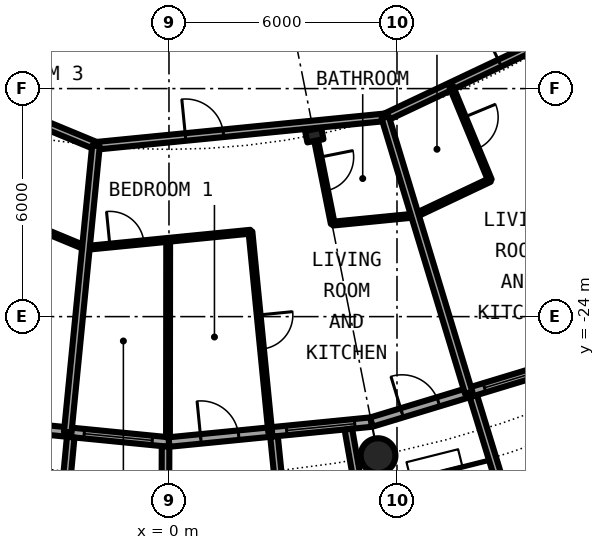
"""IFC4 building model, lengths in metres.
Left out: names, types, materials, properties, quantities, classifications, styles, units other than length and angle.
Written with IfcOpenShell. Run it as: python <this file> out.ifc"""

import sys

from ifc_helpers import new_model, si_unit, direction, frame, frame_2d, origin, origin_2d, place, context, subcontext, project, spatial, rectangle, circle, hollow_circle, i_section, extrude, element, fill, save


model = new_model("IFC4")
c1 = context("Model", 3, precision=1e-05, world=origin(), true_north=direction((0.0, 1.0)))
c2 = subcontext(c1, "Body", "Model", "MODEL_VIEW")
j1 = project(units=[si_unit("LENGTHUNIT", "METRE"), si_unit("PLANEANGLEUNIT", "RADIAN")], contexts=[c1])
p1 = place(None, origin())
s1 = spatial("IfcSite", under=j1, at=p1, CompositionType="ELEMENT")
p2 = place(p1, origin())
s2 = spatial("IfcBuilding", under=s1, at=p2, CompositionType="ELEMENT")
p3 = place(p2, frame((0.0, 0.0, 120.8)))
s3 = spatial("IfcBuildingStorey", under=s2, at=p3, CompositionType="ELEMENT", Elevation=120.8)
p4 = place(p3, frame((5.501, -27.658, 0.0), z_axis=(0.0, 0.0, 1.0), x_axis=(1.0, 0.0, 0.0)))
e1 = element("IfcColumn", 1, at=p4, inside=s3, PredefinedType="COLUMN", context=c2, shape_type="SweptSolid", body=[
    extrude(hollow_circle(Radius=0.457, WallThickness=0.04, at=origin_2d()), origin(), (0.0, 0.0, 1.0), 3.05),
])
p5 = place(p3, frame((3.824, -19.223, 0.0), z_axis=(0.0, 0.0, 1.0), x_axis=(0.195090322016, -0.980785280403, 0.0)))
e2 = element("IfcColumn", 2, at=p5, inside=s3, PredefinedType="COLUMN", context=c2, shape_type="SweptSolid", body=[
    extrude(i_section(OverallWidth=0.307, OverallDepth=0.432, WebThickness=0.021, FlangeThickness=0.04, FilletRadius=0.027, at=origin_2d()), origin(), (0.0, 0.0, 1.0), 3.05),
])
p6 = place(p3, frame((-5.326, -26.775, 0.0), z_axis=(0.0, 0.0, 1.0), x_axis=(0.995173996315, -0.098126026407, 0.0)))
e3 = element("IfcWall", 3, at=p6, inside=s3, PredefinedType="SOLIDWALL", context=c2, shape_type="SweptSolid", body=[
    extrude(rectangle(XDim=5.352, YDim=0.25, at=frame_2d((2.676, 0.0))), origin(), (0.0, 0.0, 1.0), 2.7),
])
p7 = place(p6, frame((0.841, 0.0, 0.0)))
e4 = element("IfcOpeningElement", 4, at=p7, cuts=e3, PredefinedType="OPENING", context=c2, shape_type="SweptSolid", body=[
    extrude(rectangle(XDim=1.0, YDim=2.2, at=frame_2d((0.5, 1.1))), frame((0.0, 0.135, 0.0), z_axis=(0.0, -1.0, 0.0), x_axis=(1.0, 0.0, 0.0)), (0.0, 0.0, 1.0), 0.27),
])
p8 = place(p6, frame((3.111, 0.0, 0.3)))
e5 = element("IfcOpeningElement", 5, at=p8, cuts=e3, PredefinedType="OPENING", context=c2, shape_type="SweptSolid", body=[
    extrude(rectangle(XDim=1.8, YDim=2.1, at=frame_2d((0.9, 1.05))), frame((0.0, 0.135, 0.0), z_axis=(0.0, -1.0, 0.0), x_axis=(1.0, 0.0, 0.0)), (0.0, 0.0, 1.0), 0.27),
])
p9 = place(p3, frame((-2.586, -27.171, -0.03), z_axis=(0.0, 0.0, 1.0), x_axis=(-0.094548432284, -0.995520262954, 0.0)))
e6 = element("IfcWall", 6, at=p9, inside=s3, PredefinedType="SOLIDWALL", context=c2, shape_type="SweptSolid", body=[
    extrude(rectangle(XDim=3.006, YDim=0.2, at=frame_2d((1.503, 0.0))), origin(), (0.0, 0.0, 1.0), 2.73),
])
p10 = place(p3, frame((-0.09, -27.417, -0.03), z_axis=(0.0, 0.0, 1.0), x_axis=(-0.00347308367, -0.999993968827, 0.0)))
e7 = element("IfcWall", 7, at=p10, inside=s3, PredefinedType="SOLIDWALL", context=c2, shape_type="SweptSolid", body=[
    extrude(rectangle(XDim=2.882, YDim=0.2, at=frame_2d((1.441, 0.0))), origin(), (0.0, 0.0, 1.0), 2.73),
])
p11 = place(p3, frame((0.0, -27.3, 0.0), z_axis=(0.0, 0.0, 1.0), x_axis=(0.995173996315, 0.098126026407, 0.0)))
e8 = element("IfcWall", 8, at=p11, inside=s3, PredefinedType="SOLIDWALL", context=c2, shape_type="SweptSolid", body=[
    extrude(rectangle(XDim=5.352, YDim=0.25, at=frame_2d((2.676, 0.0))), origin(), (0.0, 0.0, 1.0), 2.7),
])
p12 = place(p11, frame((0.841, 0.0, 0.0)))
e9 = element("IfcOpeningElement", 9, at=p12, cuts=e8, PredefinedType="OPENING", context=c2, shape_type="SweptSolid", body=[
    extrude(rectangle(XDim=1.0, YDim=2.2, at=frame_2d((0.5, 1.1))), frame((0.0, 0.135, 0.0), z_axis=(0.0, -1.0, 0.0), x_axis=(1.0, 0.0, 0.0)), (0.0, 0.0, 1.0), 0.27),
])
p13 = place(p11, frame((3.111, 0.0, 0.3)))
e10 = element("IfcOpeningElement", 10, at=p13, cuts=e8, PredefinedType="OPENING", context=c2, shape_type="SweptSolid", body=[
    extrude(rectangle(XDim=1.8, YDim=2.1, at=frame_2d((0.9, 1.05))), frame((0.0, 0.135, 0.0), z_axis=(0.0, -1.0, 0.0), x_axis=(1.0, 0.0, 0.0)), (0.0, 0.0, 1.0), 0.27),
])
p14 = place(p3, frame((2.764, -27.153, -0.03), z_axis=(0.0, 0.0, 1.0), x_axis=(0.101505487237, -0.994834979311, 0.0)))
e11 = element("IfcWall", 11, at=p14, inside=s3, PredefinedType="SOLIDWALL", context=c2, shape_type="SweptSolid", body=[
    extrude(rectangle(XDim=3.007, YDim=0.2, at=frame_2d((1.503, 0.0))), origin(), (0.0, 0.0, 1.0), 2.73),
])
p15 = place(p3, frame((4.72, -26.961, -0.03), z_axis=(0.0, 0.0, 1.0), x_axis=(0.172463232037, -0.98501595601, 0.0)))
e12 = element("IfcWall", 12, at=p15, inside=s3, PredefinedType="SOLIDWALL", context=c2, shape_type="SweptSolid", body=[
    extrude(rectangle(XDim=2.929, YDim=0.2, at=frame_2d((1.464, 0.0))), origin(), (0.0, 0.0, 1.0), 2.73),
])
p16 = place(p3, frame((5.326, -26.775, 0.0), z_axis=(0.0, 0.0, 1.0), x_axis=(0.956965678721, 0.290201119486, 0.0)))
e13 = element("IfcWall", 13, at=p16, inside=s3, PredefinedType="SOLIDWALL", context=c2, shape_type="SweptSolid", body=[
    extrude(rectangle(XDim=5.351, YDim=0.25, at=frame_2d((2.676, 0.0))), origin(), (0.0, 0.0, 1.0), 2.7),
])
p17 = place(p16, frame((0.841, 0.0, 0.0)))
e14 = element("IfcOpeningElement", 14, at=p17, cuts=e13, PredefinedType="OPENING", context=c2, shape_type="SweptSolid", body=[
    extrude(rectangle(XDim=1.0, YDim=2.2, at=frame_2d((0.5, 1.1))), frame((0.0, 0.135, 0.0), z_axis=(0.0, -1.0, 0.0), x_axis=(1.0, 0.0, 0.0)), (0.0, 0.0, 1.0), 0.27),
])
p18 = place(p16, frame((3.111, 0.0, 0.3)))
e15 = element("IfcOpeningElement", 15, at=p18, cuts=e13, PredefinedType="OPENING", context=c2, shape_type="SweptSolid", body=[
    extrude(rectangle(XDim=1.8, YDim=2.1, at=frame_2d((0.9, 1.05))), frame((0.0, 0.135, 0.0), z_axis=(0.0, -1.0, 0.0), x_axis=(1.0, 0.0, 0.0)), (0.0, 0.0, 1.0), 0.27),
])
p19 = place(p3, frame((8.82, -29.093, -0.03), z_axis=(0.0, 0.0, 1.0), x_axis=(0.941461077774, 0.337121697664, 0.0)))
e16 = element("IfcWall", 16, at=p19, inside=s3, PredefinedType="SOLIDWALL", context=c2, shape_type="SweptSolid", body=[
    extrude(rectangle(XDim=2.993, YDim=0.2, at=frame_2d((1.497, 0.0))), origin(), (0.0, 0.0, 1.0), 2.73),
])
p20 = place(p19, frame((0.457, 0.0, 0.33)))
e17 = element("IfcOpeningElement", 17, at=p20, cuts=e16, PredefinedType="OPENING", context=c2, shape_type="SweptSolid", body=[
    extrude(circle(Radius=1.04, at=frame_2d((1.04, 1.04))), frame((0.0, 0.11, 0.0), z_axis=(0.0, -1.0, 0.0), x_axis=(1.0, 0.0, 0.0)), (0.0, 0.0, 1.0), 0.22),
])
p21 = place(p3, frame((8.009, -26.092, -0.03), z_axis=(0.0, 0.0, 1.0), x_axis=(0.293406695073, -0.955987715029, 0.0)))
e18 = element("IfcWall", 18, at=p21, inside=s3, PredefinedType="SOLIDWALL", context=c2, shape_type="SweptSolid", body=[
    extrude(rectangle(XDim=3.006, YDim=0.2, at=frame_2d((1.503, 0.0))), origin(), (0.0, 0.0, 1.0), 2.73),
])
p22 = place(p3, frame((6.473, -21.34, 0.0), z_axis=(0.0, 0.0, 1.0), x_axis=(0.903929143338, 0.427682246328, 0.0)))
e19 = element("IfcWall", 19, at=p22, inside=s3, PredefinedType="PARTITIONING", context=c2, shape_type="SweptSolid", body=[
    extrude(rectangle(XDim=2.182, YDim=0.1, at=frame_2d((1.091, 0.0))), origin(), (0.0, 0.0, 1.0), 2.7),
])
p23 = place(p3, frame((-2.193, -22.194, 0.0), z_axis=(0.0, 0.0, 1.0), x_axis=(0.995173152282, 0.098134586035, 0.0)))
e20 = element("IfcWall", 20, at=p23, inside=s3, PredefinedType="PARTITIONING", context=c2, shape_type="SweptSolid", body=[
    extrude(rectangle(XDim=4.361, YDim=0.1, at=frame_2d((2.181, 0.0))), origin(), (0.0, 0.0, 1.0), 2.7),
])
p24 = place(p23, frame((0.641, 0.0, 0.0)))
e21 = element("IfcOpeningElement", 21, at=p24, cuts=e20, PredefinedType="OPENING", context=c2, shape_type="SweptSolid", body=[
    extrude(rectangle(XDim=0.9, YDim=2.3, at=frame_2d((0.45, 1.15))), frame((0.0, 0.06, 0.0), z_axis=(0.0, -1.0, 0.0), x_axis=(1.0, 0.0, 0.0)), (0.0, 0.0, 1.0), 0.12),
])
p25 = place(p3, frame((4.311, -21.553, 0.0), z_axis=(0.0, 0.0, 1.0), x_axis=(0.995195976339, 0.097902853268, 0.0)))
e22 = element("IfcWall", 22, at=p25, inside=s3, PredefinedType="PARTITIONING", context=c2, shape_type="SweptSolid", body=[
    extrude(rectangle(XDim=2.175, YDim=0.1, at=frame_2d((1.087, 0.0))), origin(), (0.0, 0.0, 1.0), 2.7),
])
p26 = place(p3, frame((-8.164, -19.716, 0.0), z_axis=(0.0, 0.0, 1.0), x_axis=(0.92387253274, -0.38270033087, 0.0)))
e23 = element("IfcWall", 23, at=p26, inside=s3, PredefinedType="PARTITIONING", context=c2, shape_type="SweptSolid", body=[
    extrude(rectangle(XDim=6.475, YDim=0.1, at=frame_2d((3.238, 0.0))), origin(), (0.0, 0.0, 1.0), 2.7),
])
p27 = place(p3, frame((5.686, -18.758, 0.0), z_axis=(0.0, 0.0, 1.0), x_axis=(0.903961383505, 0.427614098379, 0.0)))
e24 = element("IfcWall", 24, at=p27, inside=s3, PredefinedType="PARTITIONING", context=c2, shape_type="SweptSolid", body=[
    extrude(rectangle(XDim=5.601, YDim=0.2, at=frame_2d((2.8, 0.0))), origin(), (0.0, 0.0, 1.0), 2.39),
])
p28 = place(p27, frame((3.339, 0.0, 0.0)))
e25 = element("IfcOpeningElement", 25, at=p28, cuts=e24, PredefinedType="OPENING", context=c2, shape_type="SweptSolid", body=[
    extrude(rectangle(XDim=1.0, YDim=2.3, at=frame_2d((0.5, 1.15))), frame((0.0, 0.11, 0.0), z_axis=(0.0, -1.0, 0.0), x_axis=(1.0, 0.0, 0.0)), (0.0, 0.0, 1.0), 0.22),
])
p29 = place(p3, frame((-1.921, -19.506, 0.0), z_axis=(0.0, 0.0, 1.0), x_axis=(0.995172982325, 0.098136309541, 0.0)))
e26 = element("IfcWall", 26, at=p29, inside=s3, PredefinedType="PARTITIONING", context=c2, shape_type="SweptSolid", body=[
    extrude(rectangle(XDim=7.655, YDim=0.2, at=frame_2d((3.827, 0.0))), origin(), (0.0, 0.0, 1.0), 2.39),
])
p30 = place(p29, frame((2.368, 0.0, 0.0)))
e27 = element("IfcOpeningElement", 27, at=p30, cuts=e26, PredefinedType="OPENING", context=c2, shape_type="SweptSolid", body=[
    extrude(rectangle(XDim=1.0, YDim=2.3, at=frame_2d((0.5, 1.15))), frame((0.0, 0.11, 0.0), z_axis=(0.0, -1.0, 0.0), x_axis=(1.0, 0.0, 0.0)), (0.0, 0.0, 1.0), 0.22),
])
p31 = place(p3, frame((-12.434, -15.151, 0.0), z_axis=(0.0, 0.0, 1.0), x_axis=(0.923888467236, -0.382661861319, 0.0)))
e28 = element("IfcWall", 28, at=p31, inside=s3, PredefinedType="PARTITIONING", context=c2, shape_type="SweptSolid", body=[
    extrude(rectangle(XDim=11.381, YDim=0.2, at=frame_2d((5.691, 0.0))), origin(), (0.0, 0.0, 1.0), 2.7),
])
p32 = place(p31, frame((3.292, 0.0, 0.0)))
e29 = element("IfcOpeningElement", 29, at=p32, cuts=e28, PredefinedType="OPENING", context=c2, shape_type="SweptSolid", body=[
    extrude(rectangle(XDim=1.0, YDim=2.3, at=frame_2d((0.5, 1.15))), frame((0.0, 0.11, 0.0), z_axis=(0.0, -1.0, 0.0), x_axis=(1.0, 0.0, 0.0)), (0.0, 0.0, 1.0), 0.22),
])
p33 = place(p3, frame((-2.664, -27.044, 0.0), z_axis=(0.0, 0.0, 1.0), x_axis=(0.098115395479, 0.995175044487, 0.0)))
e30 = element("IfcWall", 30, at=p33, inside=s3, PredefinedType="PARTITIONING", context=c2, shape_type="SweptSolid", body=[
    extrude(rectangle(XDim=7.574, YDim=0.2, at=frame_2d((3.787, 0.0))), origin(), (0.0, 0.0, 1.0), 2.7),
])
p34 = place(p3, frame((-0.026, -27.175, 0.0), z_axis=(0.0, 0.0, 1.0), x_axis=(0.00093971673, 0.999999558466, 0.0)))
e31 = element("IfcWall", 31, at=p34, inside=s3, PredefinedType="PARTITIONING", context=c2, shape_type="SweptSolid", body=[
    extrude(rectangle(XDim=5.196, YDim=0.1, at=frame_2d((2.598, 0.0))), origin(), (0.0, 0.0, 1.0), 2.7),
])
p35 = place(p3, frame((2.144, -21.766, 0.0), z_axis=(0.0, 0.0, 1.0), x_axis=(0.098054199821, -0.995181075934, 0.0)))
e32 = element("IfcWall", 32, at=p35, inside=s3, PredefinedType="PARTITIONING", context=c2, shape_type="SweptSolid", body=[
    extrude(rectangle(XDim=5.303, YDim=0.1, at=frame_2d((2.652, 0.0))), origin(), (0.0, 0.0, 1.0), 2.7),
])
p36 = place(p35, frame((2.202, 0.0, 0.0)))
e33 = element("IfcOpeningElement", 33, at=p36, cuts=e32, PredefinedType="OPENING", context=c2, shape_type="SweptSolid", body=[
    extrude(rectangle(XDim=0.9, YDim=2.3, at=frame_2d((0.45, 1.15))), frame((0.0, 0.06, 0.0), z_axis=(0.0, -1.0, 0.0), x_axis=(1.0, 0.0, 0.0)), (0.0, 0.0, 1.0), 0.12),
])
p37 = place(p3, frame((3.885, -19.432, 0.0), z_axis=(0.0, 0.0, 1.0), x_axis=(0.196051018784, -0.980593696713, 0.0)))
e34 = element("IfcWall", 34, at=p37, inside=s3, PredefinedType="PARTITIONING", context=c2, shape_type="SweptSolid", body=[
    extrude(rectangle(XDim=2.163, YDim=0.1, at=frame_2d((1.082, 0.0))), origin(), (0.0, 0.0, 1.0), 2.7),
])
p38 = place(p37, frame((0.382, 0.0, 0.0)))
e35 = element("IfcOpeningElement", 35, at=p38, cuts=e34, PredefinedType="OPENING", context=c2, shape_type="SweptSolid", body=[
    extrude(rectangle(XDim=0.9, YDim=2.3, at=frame_2d((0.45, 1.15))), frame((0.0, 0.06, 0.0), z_axis=(0.0, -1.0, 0.0), x_axis=(1.0, 0.0, 0.0)), (0.0, 0.0, 1.0), 0.12),
])
p39 = place(p3, frame((5.689, -18.756, 0.0), z_axis=(0.0, 0.0, 1.0), x_axis=(0.290294523619, -0.956937348815, 0.0)))
e36 = element("IfcWall", 36, at=p39, inside=s3, PredefinedType="PARTITIONING", context=c2, shape_type="SweptSolid", body=[
    extrude(rectangle(XDim=7.575, YDim=0.2, at=frame_2d((3.788, 0.0))), origin(), (0.0, 0.0, 1.0), 2.7),
])
p40 = place(p3, frame((7.423, -17.936, 0.0), z_axis=(0.0, 0.0, 1.0), x_axis=(0.382195876364, -0.924081334132, 0.0)))
e37 = element("IfcWall", 37, at=p40, inside=s3, PredefinedType="PARTITIONING", context=c2, shape_type="SweptSolid", body=[
    extrude(rectangle(XDim=2.674, YDim=0.1, at=frame_2d((1.337, 0.0))), origin(), (0.0, 0.0, 1.0), 2.7),
])
p41 = place(p40, frame((0.887, 0.0, 0.0)))
e38 = element("IfcOpeningElement", 38, at=p41, cuts=e37, PredefinedType="OPENING", context=c2, shape_type="SweptSolid", body=[
    extrude(rectangle(XDim=0.9, YDim=2.3, at=frame_2d((0.45, 1.15))), frame((0.0, 0.06, 0.0), z_axis=(0.0, -1.0, 0.0), x_axis=(1.0, 0.0, 0.0)), (0.0, 0.0, 1.0), 0.12),
])
p42 = place(p8, origin())
e39 = element("IfcWindow", 39, at=p42, inside=s3, PartitioningType="SINGLE_PANEL", PredefinedType="WINDOW", context=c2, shape_type="SweptSolid", body=[
    extrude(rectangle(XDim=1.8, YDim=2.1, at=frame_2d((0.9, 1.05))), frame((0.0, 0.03, 0.0), z_axis=(0.0, -1.0, 0.0), x_axis=(1.0, 0.0, 0.0)), (0.0, 0.0, 1.0), 0.06),
])
fill(e5, e39)
p43 = place(p12, origin())
e40 = element("IfcDoor", 40, at=p43, inside=s3, OperationType="SINGLE_SWING_LEFT", PredefinedType="DOOR", context=c2, shape_type="SweptSolid", body=[
    extrude(rectangle(XDim=1.0, YDim=2.2, at=frame_2d((0.5, 1.1))), frame((0.0, 0.025, 0.0), z_axis=(0.0, -1.0, 0.0), x_axis=(1.0, 0.0, 0.0)), (0.0, 0.0, 1.0), 0.05),
])
fill(e9, e40)
p44 = place(p13, origin())
e41 = element("IfcWindow", 41, at=p44, inside=s3, PartitioningType="SINGLE_PANEL", PredefinedType="WINDOW", context=c2, shape_type="SweptSolid", body=[
    extrude(rectangle(XDim=1.8, YDim=2.1, at=frame_2d((0.9, 1.05))), frame((0.0, 0.03, 0.0), z_axis=(0.0, -1.0, 0.0), x_axis=(1.0, 0.0, 0.0)), (0.0, 0.0, 1.0), 0.06),
])
fill(e10, e41)
p45 = place(p17, origin())
e42 = element("IfcDoor", 42, at=p45, inside=s3, OperationType="SINGLE_SWING_LEFT", PredefinedType="DOOR", context=c2, shape_type="SweptSolid", body=[
    extrude(rectangle(XDim=1.0, YDim=2.2, at=frame_2d((0.5, 1.1))), frame((0.0, 0.025, 0.0), z_axis=(0.0, -1.0, 0.0), x_axis=(1.0, 0.0, 0.0)), (0.0, 0.0, 1.0), 0.05),
])
fill(e14, e42)
p46 = place(p18, origin())
e43 = element("IfcWindow", 43, at=p46, inside=s3, PartitioningType="SINGLE_PANEL", PredefinedType="WINDOW", context=c2, shape_type="SweptSolid", body=[
    extrude(rectangle(XDim=1.8, YDim=2.1, at=frame_2d((0.9, 1.05))), frame((0.0, 0.03, 0.0), z_axis=(0.0, -1.0, 0.0), x_axis=(1.0, 0.0, 0.0)), (0.0, 0.0, 1.0), 0.06),
])
fill(e15, e43)
p47 = place(p30, origin())
e44 = element("IfcDoor", 44, at=p47, inside=s3, OperationType="SINGLE_SWING_LEFT", PredefinedType="DOOR", context=c2, shape_type="SweptSolid", body=[
    extrude(rectangle(XDim=1.0, YDim=2.3, at=frame_2d((0.5, 1.15))), frame((0.0, 0.025, 0.0), z_axis=(0.0, -1.0, 0.0), x_axis=(1.0, 0.0, 0.0)), (0.0, 0.0, 1.0), 0.05),
])
fill(e27, e44)
p48 = place(p38, origin())
e45 = element("IfcDoor", 45, at=p48, inside=s3, OperationType="SINGLE_SWING_LEFT", PredefinedType="DOOR", context=c2, shape_type="SweptSolid", body=[
    extrude(rectangle(XDim=0.9, YDim=2.3, at=frame_2d((0.45, 1.15))), frame((0.0, 0.025, 0.0), z_axis=(0.0, -1.0, 0.0), x_axis=(1.0, 0.0, 0.0)), (0.0, 0.0, 1.0), 0.05),
])
fill(e35, e45)
p49 = place(p36, origin())
e46 = element("IfcDoor", 46, at=p49, inside=s3, OperationType="SINGLE_SWING_RIGHT", PredefinedType="DOOR", context=c2, shape_type="SweptSolid", body=[
    extrude(rectangle(XDim=0.9, YDim=2.3, at=frame_2d((0.45, 1.15))), frame((0.0, 0.025, 0.0), z_axis=(0.0, -1.0, 0.0), x_axis=(1.0, 0.0, 0.0)), (0.0, 0.0, 1.0), 0.05),
])
fill(e33, e46)
p50 = place(p24, origin())
e47 = element("IfcDoor", 47, at=p50, inside=s3, OperationType="SINGLE_SWING_LEFT", PredefinedType="DOOR", context=c2, shape_type="SweptSolid", body=[
    extrude(rectangle(XDim=0.9, YDim=2.3, at=frame_2d((0.45, 1.15))), frame((0.0, 0.025, 0.0), z_axis=(0.0, -1.0, 0.0), x_axis=(1.0, 0.0, 0.0)), (0.0, 0.0, 1.0), 0.05),
])
fill(e21, e47)
p51 = place(p28, origin())
e48 = element("IfcDoor", 48, at=p51, inside=s3, OperationType="SINGLE_SWING_RIGHT", PredefinedType="DOOR", context=c2, shape_type="SweptSolid", body=[
    extrude(rectangle(XDim=1.0, YDim=2.3, at=frame_2d((0.5, 1.15))), frame((0.0, 0.025, 0.0), z_axis=(0.0, -1.0, 0.0), x_axis=(1.0, 0.0, 0.0)), (0.0, 0.0, 1.0), 0.05),
])
fill(e25, e48)
p52 = place(p41, origin())
e49 = element("IfcDoor", 49, at=p52, inside=s3, OperationType="SINGLE_SWING_RIGHT", PredefinedType="DOOR", context=c2, shape_type="SweptSolid", body=[
    extrude(rectangle(XDim=0.9, YDim=2.3, at=frame_2d((0.45, 1.15))), frame((0.0, 0.025, 0.0), z_axis=(0.0, -1.0, 0.0), x_axis=(1.0, 0.0, 0.0)), (0.0, 0.0, 1.0), 0.05),
])
fill(e38, e49)
save(model, sys.argv[1])
